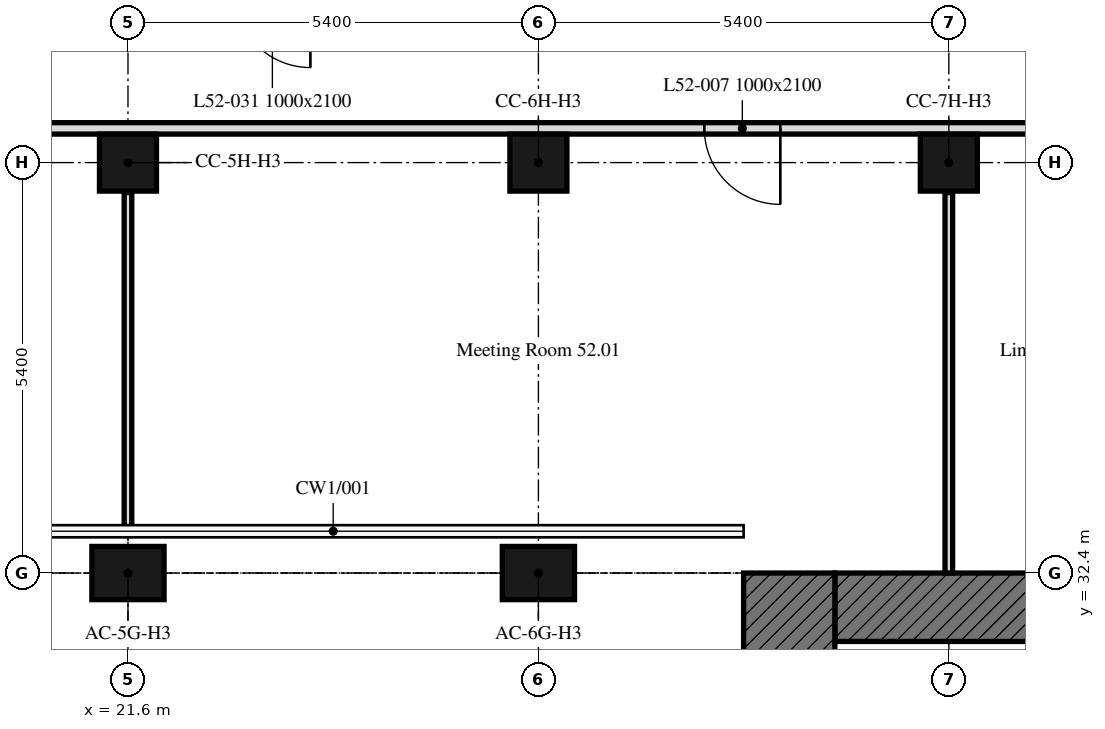
"""IFC4 building model, lengths in metres.
Left out: names, types, materials, properties, quantities, classifications, styles, units other than length and angle.
Written with IfcOpenShell. Run it as: python <this file> out.ifc"""

import sys

from ifc_helpers import new_model, si_unit, direction, frame, frame_2d, origin, origin_2d, place, context, subcontext, project, spatial, rectangle, extrude, element, fill, save


model = new_model("IFC4")
c1 = context("Model", 3, precision=1e-05, world=origin(), true_north=direction((0.0, 1.0)))
c2 = subcontext(c1, "Body", "Model", "MODEL_VIEW")
j1 = project(units=[si_unit("LENGTHUNIT", "METRE"), si_unit("PLANEANGLEUNIT", "RADIAN")], contexts=[c1])
p1 = place(None, origin())
s1 = spatial("IfcSite", under=j1, at=p1, CompositionType="ELEMENT")
p2 = place(p1, origin())
s2 = spatial("IfcBuilding", under=s1, at=p2, CompositionType="ELEMENT")
p3 = place(p2, frame((0.0, 0.0, 210.4)))
s3 = spatial("IfcBuildingStorey", under=s2, at=p3, CompositionType="ELEMENT", Elevation=210.4)
for number, where, z_axis, x_axis in (
    (1, (21.6, 32.4, 0.0), (0.0, 0.0, 1.0), (1.0, 0.0, 0.0)),
    (2, (27.0, 32.4, 0.0), (0.0, 0.0, 1.0), (1.0, 0.0, 0.0)),
):
    element("IfcColumn", number, at=place(p3, frame(where, z_axis=z_axis, x_axis=x_axis)), inside=s3, PredefinedType="COLUMN", context=c2, shape_type="SweptSolid", body=[
        extrude(rectangle(XDim=0.95, YDim=0.7, at=origin_2d()), origin(), (0.0, 0.0, 1.0), 3.0),
    ])
for number, where, z_axis, x_axis in (
    (3, (21.6, 37.8, 0.0), (0.0, 0.0, 1.0), (1.0, 0.0, 0.0)),
    (4, (27.0, 37.8, 0.0), (0.0, 0.0, 1.0), (1.0, 0.0, 0.0)),
    (5, (32.4, 37.8, 0.0), (0.0, 0.0, 1.0), (1.0, 0.0, 0.0)),
):
    element("IfcColumn", number, at=place(p3, frame(where, z_axis=z_axis, x_axis=x_axis)), inside=s3, PredefinedType="COLUMN", context=c2, shape_type="SweptSolid", body=[
        extrude(rectangle(XDim=0.75, YDim=0.75, at=origin_2d()), origin(), (0.0, 0.0, 1.0), 3.0),
    ])
p4 = place(p3, frame((30.9, 31.95, 0.0), z_axis=(0.0, 0.0, 1.0), x_axis=(1.0, 0.0, 0.0)))
e6 = element("IfcWall", 6, at=p4, inside=s3, PredefinedType="SOLIDWALL", context=c2, shape_type="SweptSolid", body=[
    extrude(rectangle(XDim=11.1, YDim=0.9, at=frame_2d((5.55, 0.0))), origin(), (0.0, 0.0, 1.0), 3.0),
])
p5 = place(p4, frame((5.55, 0.0, 0.0)))
e7 = element("IfcOpeningElement", 7, at=p5, cuts=e6, PredefinedType="OPENING", context=c2, shape_type="SweptSolid", body=[
    extrude(rectangle(XDim=2.0, YDim=2.4, at=frame_2d((1.0, 1.2))), frame((0.0, 0.45, 0.0), z_axis=(0.0, -1.0, 0.0), x_axis=(1.0, 0.0, 0.0)), (0.0, 0.0, 1.0), 0.9),
])
p6 = place(p3, frame((30.3, 16.2, 0.0), z_axis=(0.0, 0.0, 1.0), x_axis=(0.0, 1.0, 0.0)))
e8 = element("IfcWall", 8, at=p6, inside=s3, PredefinedType="SOLIDWALL", context=c2, shape_type="SweptSolid", body=[
    extrude(rectangle(XDim=16.2, YDim=1.2, at=frame_2d((8.1, 0.0))), origin(), (0.0, 0.0, 1.0), 3.0),
])
p7 = place(p3, frame((32.4, 32.4, 0.0), z_axis=(0.0, 0.0, 1.0), x_axis=(0.0, 1.0, 0.0)))
e9 = element("IfcWall", 9, at=p7, inside=s3, PredefinedType="PARTITIONING", context=c2, shape_type="SweptSolid", body=[
    extrude(rectangle(XDim=5.005, YDim=0.1, at=frame_2d((2.502, 0.0))), origin(), (0.0, 0.0, 1.0), 2.4),
])
p8 = place(p3, frame((21.6, 37.405, 0.0), z_axis=(0.0, 0.0, 1.0), x_axis=(0.0, -1.0, 0.0)))
e10 = element("IfcWall", 10, at=p8, inside=s3, PredefinedType="PARTITIONING", context=c2, shape_type="SweptSolid", body=[
    extrude(rectangle(XDim=4.51, YDim=0.1, at=frame_2d((2.255, 0.0))), origin(), (0.0, 0.0, 1.0), 2.4),
])
p9 = place(p3, frame((42.449, 38.25, 0.0), z_axis=(0.0, 0.0, 1.0), x_axis=(-1.0, 0.0, 0.0)))
e11 = element("IfcWall", 11, at=p9, inside=s3, PredefinedType="PARTITIONING", context=c2, shape_type="SweptSolid", body=[
    extrude(rectangle(XDim=37.049, YDim=0.15, at=frame_2d((18.524, 0.0))), origin(), (0.0, 0.0, 1.0), 2.4),
])
p10 = place(p9, frame((12.266, 0.0, 0.0)))
e12 = element("IfcOpeningElement", 12, at=p10, cuts=e11, PredefinedType="OPENING", context=c2, shape_type="SweptSolid", body=[
    extrude(rectangle(XDim=1.0, YDim=2.1, at=frame_2d((0.5, 1.05))), frame((0.0, 0.075, 0.0), z_axis=(0.0, -1.0, 0.0), x_axis=(1.0, 0.0, 0.0)), (0.0, 0.0, 1.0), 0.15),
])
p11 = place(p9, frame((23.049, 0.0, 0.0)))
e13 = element("IfcOpeningElement", 13, at=p11, cuts=e11, PredefinedType="OPENING", context=c2, shape_type="SweptSolid", body=[
    extrude(rectangle(XDim=1.0, YDim=2.1, at=frame_2d((0.5, 1.05))), frame((0.0, 0.075, 0.0), z_axis=(0.0, -1.0, 0.0), x_axis=(1.0, 0.0, 0.0)), (0.0, 0.0, 1.0), 0.15),
])
p12 = place(p9, frame((1.409, 0.0, 0.0)))
e14 = element("IfcOpeningElement", 14, at=p12, cuts=e11, PredefinedType="OPENING", context=c2, shape_type="SweptSolid", body=[
    extrude(rectangle(XDim=1.0, YDim=2.1, at=frame_2d((0.5, 1.05))), frame((0.0, 0.075, 0.0), z_axis=(0.0, -1.0, 0.0), x_axis=(1.0, 0.0, 0.0)), (0.0, 0.0, 1.0), 0.15),
])
p13 = place(p9, frame((28.199, 0.0, 0.0)))
e15 = element("IfcOpeningElement", 15, at=p13, cuts=e11, PredefinedType="OPENING", context=c2, shape_type="SweptSolid", body=[
    extrude(rectangle(XDim=1.0, YDim=2.1, at=frame_2d((0.5, 1.05))), frame((0.0, 0.075, 0.0), z_axis=(0.0, -1.0, 0.0), x_axis=(1.0, 0.0, 0.0)), (0.0, 0.0, 1.0), 0.15),
])
p14 = place(p9, frame((7.099, 0.0, 0.0)))
e16 = element("IfcOpeningElement", 16, at=p14, cuts=e11, PredefinedType="OPENING", context=c2, shape_type="SweptSolid", body=[
    extrude(rectangle(XDim=1.0, YDim=2.1, at=frame_2d((0.5, 1.05))), frame((0.0, 0.075, 0.0), z_axis=(0.0, -1.0, 0.0), x_axis=(1.0, 0.0, 0.0)), (0.0, 0.0, 1.0), 0.15),
])
p15 = place(p9, frame((5.629, 0.0, 0.0)))
e17 = element("IfcOpeningElement", 17, at=p15, cuts=e11, PredefinedType="OPENING", context=c2, shape_type="SweptSolid", body=[
    extrude(rectangle(XDim=1.0, YDim=2.1, at=frame_2d((0.5, 1.05))), frame((0.0, 0.075, 0.0), z_axis=(0.0, -1.0, 0.0), x_axis=(1.0, 0.0, 0.0)), (0.0, 0.0, 1.0), 0.15),
])
p16 = place(p9, frame((29.669, 0.0, 0.0)))
e18 = element("IfcOpeningElement", 18, at=p16, cuts=e11, PredefinedType="OPENING", context=c2, shape_type="SweptSolid", body=[
    extrude(rectangle(XDim=1.0, YDim=2.1, at=frame_2d((0.5, 1.05))), frame((0.0, 0.075, 0.0), z_axis=(0.0, -1.0, 0.0), x_axis=(1.0, 0.0, 0.0)), (0.0, 0.0, 1.0), 0.15),
])
p17 = place(p10, origin())
e19 = element("IfcDoor", 19, at=p17, inside=s3, OperationType="SINGLE_SWING_RIGHT", PredefinedType="DOOR", context=c2, shape_type="SweptSolid", body=[
    extrude(rectangle(XDim=1.0, YDim=2.1, at=frame_2d((0.5, 1.05))), frame((0.0, 0.025, 0.0), z_axis=(0.0, -1.0, 0.0), x_axis=(1.0, 0.0, 0.0)), (0.0, 0.0, 1.0), 0.05),
])
fill(e12, e19)
save(model, sys.argv[1])
